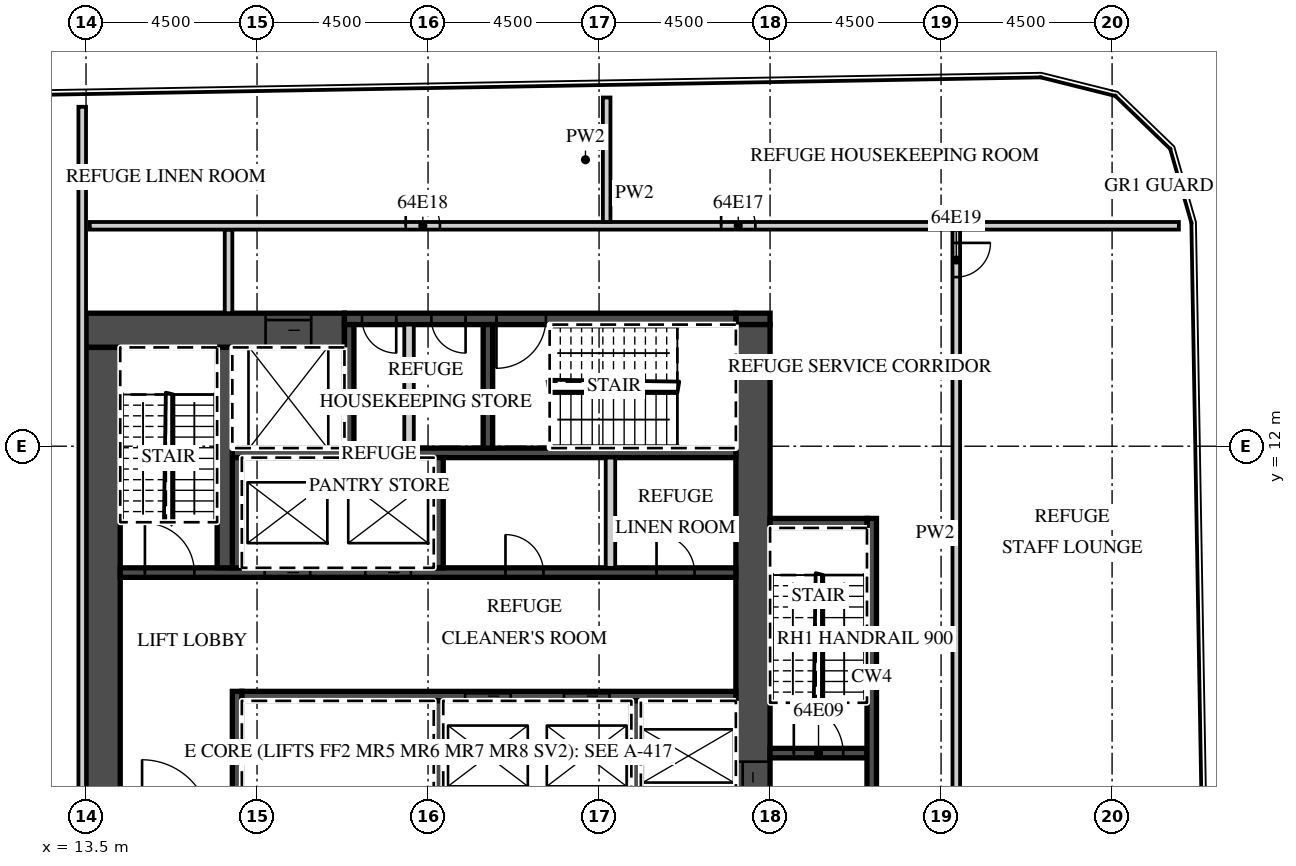
"""IFC4 building model, lengths in metres.
Left out: names, types, materials, properties, quantities, classifications, styles, units other than length and angle.
Written with IfcOpenShell. Run it as: python <this file> out.ifc"""

import sys

from ifc_helpers import new_model, si_unit, direction, frame, frame_2d, origin, place, context, subcontext, project, spatial, rectangle, extrude, element, fill, save


model = new_model("IFC4")
c1 = context("Model", 3, precision=1e-05, world=origin(), true_north=direction((0.0, 1.0)))
c2 = subcontext(c1, "Body", "Model", "MODEL_VIEW")
j1 = project(units=[si_unit("LENGTHUNIT", "METRE"), si_unit("PLANEANGLEUNIT", "RADIAN")], contexts=[c1])
p1 = place(None, origin())
s1 = spatial("IfcSite", under=j1, at=p1, CompositionType="ELEMENT")
p2 = place(p1, origin())
s2 = spatial("IfcBuilding", under=s1, at=p2, CompositionType="ELEMENT")
p3 = place(p2, frame((0.0, 0.0, 257.3)))
s3 = spatial("IfcBuildingStorey", under=s2, at=p3, CompositionType="ELEMENT", Elevation=257.3)
p4 = place(p3, frame((13.5, 15.05, 0.0), z_axis=(0.0, 0.0, 1.0), x_axis=(1.0, 0.0, 0.0)))
e1 = element("IfcWall", 1, at=p4, inside=s3, PredefinedType="SHEAR", context=c2, shape_type="SweptSolid", body=[
    extrude(rectangle(XDim=6.8, YDim=0.9, at=frame_2d((3.4, 0.0))), origin(), (0.0, 0.0, 1.0), 4.2),
])
p5 = place(p4, frame((4.725, 0.0, 0.0)))
e2 = element("IfcOpeningElement", 2, at=p5, cuts=e1, PredefinedType="OPENING", context=c2, shape_type="SweptSolid", body=[
    extrude(rectangle(XDim=1.2, YDim=2.1, at=frame_2d((0.6, 1.05))), frame((0.0, 0.46, 0.0), z_axis=(0.0, -1.0, 0.0), x_axis=(1.0, 0.0, 0.0)), (0.0, 0.0, 1.0), 0.92),
])
p6 = place(p3, frame((30.6, 15.35, 0.0), z_axis=(0.0, 0.0, 1.0), x_axis=(1.0, 0.0, 0.0)))
e3 = element("IfcWall", 3, at=p6, inside=s3, PredefinedType="SHEAR", context=c2, shape_type="SweptSolid", body=[
    extrude(rectangle(XDim=0.9, YDim=0.3, at=frame_2d((0.45, 0.0))), origin(), (0.0, 0.0, 1.0), 4.2),
])
p7 = place(p3, frame((20.3, 15.35, 0.0), z_axis=(0.0, 0.0, 1.0), x_axis=(1.0, 0.0, 0.0)))
e4 = element("IfcWall", 4, at=p7, inside=s3, PredefinedType="SHEAR", context=c2, shape_type="SweptSolid", body=[
    extrude(rectangle(XDim=10.3, YDim=0.3, at=frame_2d((5.15, 0.0))), origin(), (0.0, 0.0, 1.0), 4.2),
])
p8 = place(p7, frame((4.0, 0.0, 0.0)))
e5 = element("IfcOpeningElement", 5, at=p8, cuts=e4, PredefinedType="OPENING", context=c2, shape_type="SweptSolid", body=[
    extrude(rectangle(XDim=1.3, YDim=2.1, at=frame_2d((0.65, 1.05))), frame((0.0, 0.16, 0.0), z_axis=(0.0, -1.0, 0.0), x_axis=(1.0, 0.0, 0.0)), (0.0, 0.0, 1.0), 0.32),
])
p9 = place(p7, frame((2.288, 0.0, 0.0)))
e6 = element("IfcOpeningElement", 6, at=p9, cuts=e4, PredefinedType="OPENING", context=c2, shape_type="SweptSolid", body=[
    extrude(rectangle(XDim=0.9, YDim=2.1, at=frame_2d((0.45, 1.05))), frame((0.0, 0.16, 0.0), z_axis=(0.0, -1.0, 0.0), x_axis=(1.0, 0.0, 0.0)), (0.0, 0.0, 1.0), 0.32),
])
p10 = place(p7, frame((0.462, 0.0, 0.0)))
e7 = element("IfcOpeningElement", 7, at=p10, cuts=e4, PredefinedType="OPENING", context=c2, shape_type="SweptSolid", body=[
    extrude(rectangle(XDim=0.9, YDim=2.1, at=frame_2d((0.45, 1.05))), frame((0.0, 0.16, 0.0), z_axis=(0.0, -1.0, 0.0), x_axis=(1.0, 0.0, 0.0)), (0.0, 0.0, 1.0), 0.32),
])
p11 = place(p3, frame((31.05, 2.4, 0.0), z_axis=(0.0, 0.0, 1.0), x_axis=(0.0, 1.0, 0.0)))
e8 = element("IfcWall", 8, at=p11, inside=s3, PredefinedType="SHEAR", context=c2, shape_type="SweptSolid", body=[
    extrude(rectangle(XDim=12.8, YDim=0.9, at=frame_2d((6.4, 0.0))), origin(), (0.0, 0.0, 1.0), 4.2),
])
p12 = place(p11, frame((0.2, 0.0, 0.0)))
e9 = element("IfcOpeningElement", 9, at=p12, cuts=e8, PredefinedType="OPENING", context=c2, shape_type="SweptSolid", body=[
    extrude(rectangle(XDim=1.1, YDim=2.1, at=frame_2d((0.55, 1.05))), frame((0.0, 0.46, 0.0), z_axis=(0.0, -1.0, 0.0), x_axis=(1.0, 0.0, 0.0)), (0.0, 0.0, 1.0), 0.92),
])
p13 = place(p3, frame((13.95, 2.4, 0.0), z_axis=(0.0, 0.0, 1.0), x_axis=(0.0, 1.0, 0.0)))
e10 = element("IfcWall", 10, at=p13, inside=s3, PredefinedType="SHEAR", context=c2, shape_type="SweptSolid", body=[
    extrude(rectangle(XDim=12.2, YDim=0.9, at=frame_2d((6.1, 0.0))), origin(), (0.0, 0.0, 1.0), 4.2),
])
p14 = place(p3, frame((17.6, 5.425, 0.0), z_axis=(0.0, 0.0, 1.0), x_axis=(1.0, 0.0, 0.0)))
e11 = element("IfcWall", 11, at=p14, inside=s3, PredefinedType="SHEAR", context=c2, shape_type="SweptSolid", body=[
    extrude(rectangle(XDim=13.0, YDim=0.25, at=frame_2d((6.5, 0.0))), origin(), (0.0, 0.0, 1.0), 4.2),
])
p15 = place(p14, frame((8.475, 0.0, 0.0)))
e12 = element("IfcOpeningElement", 12, at=p15, cuts=e11, PredefinedType="OPENING", context=c2, shape_type="SweptSolid", body=[
    extrude(rectangle(XDim=1.2, YDim=2.1, at=frame_2d((0.6, 1.05))), frame((0.0, 0.135, 0.0), z_axis=(0.0, -1.0, 0.0), x_axis=(1.0, 0.0, 0.0)), (0.0, 0.0, 1.0), 0.27),
])
p16 = place(p14, frame((5.875, 0.0, 0.0)))
e13 = element("IfcOpeningElement", 13, at=p16, cuts=e11, PredefinedType="OPENING", context=c2, shape_type="SweptSolid", body=[
    extrude(rectangle(XDim=1.2, YDim=2.1, at=frame_2d((0.6, 1.05))), frame((0.0, 0.135, 0.0), z_axis=(0.0, -1.0, 0.0), x_axis=(1.0, 0.0, 0.0)), (0.0, 0.0, 1.0), 0.27),
])
p17 = place(p3, frame((17.475, 2.4, 0.0), z_axis=(0.0, 0.0, 1.0), x_axis=(0.0, 1.0, 0.0)))
e14 = element("IfcWall", 14, at=p17, inside=s3, PredefinedType="SHEAR", context=c2, shape_type="SweptSolid", body=[
    extrude(rectangle(XDim=3.15, YDim=0.25, at=frame_2d((1.575, 0.0))), origin(), (0.0, 0.0, 1.0), 4.2),
])
for number, where, z_axis, x_axis in (
    (15, (27.975, 2.4, 0.0), (0.0, 0.0, 1.0), (0.0, 1.0, 0.0)),
    (16, (22.775, 2.4, 0.0), (0.0, 0.0, 1.0), (0.0, 1.0, 0.0)),
):
    element("IfcWall", number, at=place(p3, frame(where, z_axis=z_axis, x_axis=x_axis)), inside=s3, PredefinedType="SHEAR", context=c2, shape_type="SweptSolid", body=[
        extrude(rectangle(XDim=2.9, YDim=0.25, at=frame_2d((1.45, 0.0))), origin(), (0.0, 0.0, 1.0), 4.2),
    ])
p18 = place(p3, frame((14.4, 8.675, 0.0), z_axis=(0.0, 0.0, 1.0), x_axis=(1.0, 0.0, 0.0)))
e17 = element("IfcWall", 17, at=p18, inside=s3, PredefinedType="SHEAR", context=c2, shape_type="SweptSolid", body=[
    extrude(rectangle(XDim=16.2, YDim=0.25, at=frame_2d((8.1, 0.0))), origin(), (0.0, 0.0, 1.0), 4.2),
])
p19 = place(p18, frame((6.45, 0.0, 0.0)))
e18 = element("IfcOpeningElement", 18, at=p19, cuts=e17, PredefinedType="OPENING", context=c2, shape_type="SweptSolid", body=[
    extrude(rectangle(XDim=1.2, YDim=2.1, at=frame_2d((0.6, 1.05))), frame((0.0, 0.135, 0.0), z_axis=(0.0, -1.0, 0.0), x_axis=(1.0, 0.0, 0.0)), (0.0, 0.0, 1.0), 0.27),
])
p20 = place(p18, frame((3.8, 0.0, 0.0)))
e19 = element("IfcOpeningElement", 19, at=p20, cuts=e17, PredefinedType="OPENING", context=c2, shape_type="SweptSolid", body=[
    extrude(rectangle(XDim=1.2, YDim=2.1, at=frame_2d((0.6, 1.05))), frame((0.0, 0.135, 0.0), z_axis=(0.0, -1.0, 0.0), x_axis=(1.0, 0.0, 0.0)), (0.0, 0.0, 1.0), 0.27),
])
p21 = place(p18, frame((0.65, 0.0, 0.0)))
e20 = element("IfcOpeningElement", 20, at=p21, cuts=e17, PredefinedType="OPENING", context=c2, shape_type="SweptSolid", body=[
    extrude(rectangle(XDim=1.3, YDim=2.1, at=frame_2d((0.65, 1.05))), frame((0.0, 0.135, 0.0), z_axis=(0.0, -1.0, 0.0), x_axis=(1.0, 0.0, 0.0)), (0.0, 0.0, 1.0), 0.27),
])
p22 = place(p18, frame((14.113, 0.0, 0.0)))
e21 = element("IfcOpeningElement", 21, at=p22, cuts=e17, PredefinedType="OPENING", context=c2, shape_type="SweptSolid", body=[
    extrude(rectangle(XDim=1.0, YDim=2.1, at=frame_2d((0.5, 1.05))), frame((0.0, 0.135, 0.0), z_axis=(0.0, -1.0, 0.0), x_axis=(1.0, 0.0, 0.0)), (0.0, 0.0, 1.0), 0.27),
])
p23 = place(p18, frame((10.137, 0.0, 0.0)))
e22 = element("IfcOpeningElement", 22, at=p23, cuts=e17, PredefinedType="OPENING", context=c2, shape_type="SweptSolid", body=[
    extrude(rectangle(XDim=1.0, YDim=2.1, at=frame_2d((0.5, 1.05))), frame((0.0, 0.135, 0.0), z_axis=(0.0, -1.0, 0.0), x_axis=(1.0, 0.0, 0.0)), (0.0, 0.0, 1.0), 0.27),
])
p24 = place(p3, frame((17.35, 11.825, 0.0), z_axis=(0.0, 0.0, 1.0), x_axis=(1.0, 0.0, 0.0)))
e23 = element("IfcWall", 23, at=p24, inside=s3, PredefinedType="SHEAR", context=c2, shape_type="SweptSolid", body=[
    extrude(rectangle(XDim=13.25, YDim=0.25, at=frame_2d((6.625, 0.0))), origin(), (0.0, 0.0, 1.0), 4.2),
])
for number, where, z_axis, x_axis in (
    (24, (17.475, 8.8, 0.0), (0.0, 0.0, 1.0), (0.0, 1.0, 0.0)),
    (25, (22.775, 8.8, 0.0), (0.0, 0.0, 1.0), (0.0, 1.0, 0.0)),
):
    element("IfcWall", number, at=place(p3, frame(where, z_axis=z_axis, x_axis=x_axis)), inside=s3, PredefinedType="SHEAR", context=c2, shape_type="SweptSolid", body=[
        extrude(rectangle(XDim=2.9, YDim=0.25, at=frame_2d((1.45, 0.0))), origin(), (0.0, 0.0, 1.0), 4.2),
    ])
p25 = place(p3, frame((27.3, 8.8, 0.0), z_axis=(0.0, 0.0, 1.0), x_axis=(0.0, 1.0, 0.0)))
e26 = element("IfcWall", 26, at=p25, inside=s3, PredefinedType="PARTITIONING", context=c2, shape_type="SweptSolid", body=[
    extrude(rectangle(XDim=2.9, YDim=0.25, at=frame_2d((1.45, 0.0))), origin(), (0.0, 0.0, 1.0), 4.2),
])
p26 = place(p3, frame((17.15, 8.8, 0.0), z_axis=(0.0, 0.0, 1.0), x_axis=(0.0, 1.0, 0.0)))
e27 = element("IfcWall", 27, at=p26, inside=s3, PredefinedType="SHEAR", context=c2, shape_type="SweptSolid", body=[
    extrude(rectangle(XDim=5.8, YDim=0.4, at=frame_2d((2.9, 0.0))), origin(), (0.0, 0.0, 1.0), 4.2),
])
for number, where, z_axis, x_axis in (
    (28, (20.425, 11.95, 0.0), (0.0, 0.0, 1.0), (0.0, 1.0, 0.0)),
    (29, (24.075, 11.95, 0.0), (0.0, 0.0, 1.0), (0.0, 1.0, 0.0)),
):
    element("IfcWall", number, at=place(p3, frame(where, z_axis=z_axis, x_axis=x_axis)), inside=s3, PredefinedType="SHEAR", context=c2, shape_type="SweptSolid", body=[
        extrude(rectangle(XDim=3.25, YDim=0.25, at=frame_2d((1.625, 0.0))), origin(), (0.0, 0.0, 1.0), 4.2),
    ])
p27 = place(p3, frame((22.0, 11.95, 0.0), z_axis=(0.0, 0.0, 1.0), x_axis=(0.0, 1.0, 0.0)))
e30 = element("IfcWall", 30, at=p27, inside=s3, PredefinedType="PARTITIONING", context=c2, shape_type="SweptSolid", body=[
    extrude(rectangle(XDim=3.25, YDim=0.25, at=frame_2d((1.625, 0.0))), origin(), (0.0, 0.0, 1.0), 4.2),
])
p28 = place(p3, frame((31.5, 3.925, 0.0), z_axis=(0.0, 0.0, 1.0), x_axis=(1.0, 0.0, 0.0)))
e31 = element("IfcWall", 31, at=p28, inside=s3, PredefinedType="SHEAR", context=c2, shape_type="SweptSolid", body=[
    extrude(rectangle(XDim=2.55, YDim=0.25, at=frame_2d((1.275, 0.0))), origin(), (0.0, 0.0, 1.0), 4.2),
])
p29 = place(p28, frame((0.625, 0.0, 0.0)))
e32 = element("IfcOpeningElement", 32, at=p29, cuts=e31, PredefinedType="OPENING", context=c2, shape_type="SweptSolid", body=[
    extrude(rectangle(XDim=1.3, YDim=2.1, at=frame_2d((0.65, 1.05))), frame((0.0, 0.135, 0.0), z_axis=(0.0, -1.0, 0.0), x_axis=(1.0, 0.0, 0.0)), (0.0, 0.0, 1.0), 0.27),
])
p30 = place(p3, frame((34.175, 1.75, 0.0), z_axis=(0.0, 0.0, 1.0), x_axis=(0.0, 1.0, 0.0)))
e33 = element("IfcWall", 33, at=p30, inside=s3, PredefinedType="SHEAR", context=c2, shape_type="SweptSolid", body=[
    extrude(rectangle(XDim=8.35, YDim=0.25, at=frame_2d((4.175, 0.0))), origin(), (0.0, 0.0, 1.0), 4.2),
])
p31 = place(p3, frame((31.5, 9.975, 0.0), z_axis=(0.0, 0.0, 1.0), x_axis=(1.0, 0.0, 0.0)))
e34 = element("IfcWall", 34, at=p31, inside=s3, PredefinedType="SHEAR", context=c2, shape_type="SweptSolid", body=[
    extrude(rectangle(XDim=2.55, YDim=0.25, at=frame_2d((1.275, 0.0))), origin(), (0.0, 0.0, 1.0), 4.2),
])
p32 = place(p3, frame((17.25, 15.5, 0.0), z_axis=(0.0, 0.0, 1.0), x_axis=(0.0, 1.0, 0.0)))
e35 = element("IfcWall", 35, at=p32, inside=s3, PredefinedType="PARTITIONING", context=c2, shape_type="SweptSolid", body=[
    extrude(rectangle(XDim=2.2, YDim=0.2, at=frame_2d((1.1, 0.0))), origin(), (0.0, 0.0, 1.0), 4.2),
])
p33 = place(p3, frame((36.4, 1.75, 0.0), z_axis=(0.0, 0.0, 1.0), x_axis=(0.0, 1.0, 0.0)))
e36 = element("IfcWall", 36, at=p33, inside=s3, PredefinedType="PARTITIONING", context=c2, shape_type="SweptSolid", body=[
    extrude(rectangle(XDim=15.95, YDim=0.2, at=frame_2d((7.975, 0.0))), origin(), (0.0, 0.0, 1.0), 4.2),
])
p34 = place(p33, frame((14.7, 0.0, 0.0)))
e37 = element("IfcOpeningElement", 37, at=p34, cuts=e36, PredefinedType="OPENING", context=c2, shape_type="SweptSolid", body=[
    extrude(rectangle(XDim=0.9, YDim=2.1, at=frame_2d((0.45, 1.05))), frame((0.0, 0.11, 0.0), z_axis=(0.0, -1.0, 0.0), x_axis=(1.0, 0.0, 0.0)), (0.0, 0.0, 1.0), 0.22),
])
p35 = place(p3, frame((13.6, 17.8, 0.0), z_axis=(0.0, 0.0, 1.0), x_axis=(1.0, 0.0, 0.0)))
e38 = element("IfcWall", 38, at=p35, inside=s3, PredefinedType="PARTITIONING", context=c2, shape_type="SweptSolid", body=[
    extrude(rectangle(XDim=28.657, YDim=0.2, at=frame_2d((14.329, 0.0))), origin(), (0.0, 0.0, 1.0), 4.2),
])
p36 = place(p35, frame((16.613, 0.0, 0.0)))
e39 = element("IfcOpeningElement", 39, at=p36, cuts=e38, PredefinedType="OPENING", context=c2, shape_type="SweptSolid", body=[
    extrude(rectangle(XDim=0.9, YDim=2.1, at=frame_2d((0.45, 1.05))), frame((0.0, 0.11, 0.0), z_axis=(0.0, -1.0, 0.0), x_axis=(1.0, 0.0, 0.0)), (0.0, 0.0, 1.0), 0.22),
])
p37 = place(p35, frame((8.312, 0.0, 0.0)))
e40 = element("IfcOpeningElement", 40, at=p37, cuts=e38, PredefinedType="OPENING", context=c2, shape_type="SweptSolid", body=[
    extrude(rectangle(XDim=0.9, YDim=2.1, at=frame_2d((0.45, 1.05))), frame((0.0, 0.11, 0.0), z_axis=(0.0, -1.0, 0.0), x_axis=(1.0, 0.0, 0.0)), (0.0, 0.0, 1.0), 0.22),
])
p38 = place(p3, frame((27.2, 17.9, 0.0), z_axis=(0.0, 0.0, 1.0), x_axis=(0.0, 1.0, 0.0)))
e41 = element("IfcWall", 41, at=p38, inside=s3, PredefinedType="PARTITIONING", context=c2, shape_type="SweptSolid", body=[
    extrude(rectangle(XDim=3.276, YDim=0.2, at=frame_2d((1.638, 0.0))), origin(), (0.0, 0.0, 1.0), 4.2),
])
p39 = place(p3, frame((13.4, 1.8, 0.0), z_axis=(0.0, 0.0, 1.0), x_axis=(0.0, 1.0, 0.0)))
e42 = element("IfcWall", 42, at=p39, inside=s3, PredefinedType="PARTITIONING", context=c2, shape_type="SweptSolid", body=[
    extrude(rectangle(XDim=19.131, YDim=0.2, at=frame_2d((9.565, 0.0))), origin(), (0.0, 0.0, 1.0), 4.2),
])
p40 = place(p19, origin())
e43 = element("IfcDoor", 43, at=p40, inside=s3, OperationType="SLIDING_TO_LEFT", PredefinedType="DOOR", context=c2, shape_type="SweptSolid", body=[
    extrude(rectangle(XDim=1.2, YDim=2.1, at=frame_2d((0.6, 1.05))), frame((0.0, 0.025, 0.0), z_axis=(0.0, -1.0, 0.0), x_axis=(1.0, 0.0, 0.0)), (0.0, 0.0, 1.0), 0.05),
])
fill(e18, e43)
p41 = place(p20, origin())
e44 = element("IfcDoor", 44, at=p41, inside=s3, OperationType="SLIDING_TO_RIGHT", PredefinedType="DOOR", context=c2, shape_type="SweptSolid", body=[
    extrude(rectangle(XDim=1.2, YDim=2.1, at=frame_2d((0.6, 1.05))), frame((0.0, 0.025, 0.0), z_axis=(0.0, -1.0, 0.0), x_axis=(1.0, 0.0, 0.0)), (0.0, 0.0, 1.0), 0.05),
])
fill(e19, e44)
p42 = place(p15, origin())
e45 = element("IfcDoor", 45, at=p42, inside=s3, OperationType="SLIDING_TO_LEFT", PredefinedType="DOOR", context=c2, shape_type="SweptSolid", body=[
    extrude(rectangle(XDim=1.2, YDim=2.1, at=frame_2d((0.6, 1.05))), frame((0.0, 0.025, 0.0), z_axis=(0.0, -1.0, 0.0), x_axis=(1.0, 0.0, 0.0)), (0.0, 0.0, 1.0), 0.05),
])
fill(e12, e45)
p43 = place(p16, origin())
e46 = element("IfcDoor", 46, at=p43, inside=s3, OperationType="SLIDING_TO_RIGHT", PredefinedType="DOOR", context=c2, shape_type="SweptSolid", body=[
    extrude(rectangle(XDim=1.2, YDim=2.1, at=frame_2d((0.6, 1.05))), frame((0.0, 0.025, 0.0), z_axis=(0.0, -1.0, 0.0), x_axis=(1.0, 0.0, 0.0)), (0.0, 0.0, 1.0), 0.05),
])
fill(e13, e46)
p44 = place(p5, origin())
e47 = element("IfcDoor", 47, at=p44, inside=s3, OperationType="SLIDING_TO_LEFT", PredefinedType="DOOR", context=c2, shape_type="SweptSolid", body=[
    extrude(rectangle(XDim=1.2, YDim=2.1, at=frame_2d((0.6, 1.05))), frame((0.0, 0.025, 0.0), z_axis=(0.0, -1.0, 0.0), x_axis=(1.0, 0.0, 0.0)), (0.0, 0.0, 1.0), 0.05),
])
fill(e2, e47)
p45 = place(p12, origin())
e48 = element("IfcDoor", 48, at=p45, inside=s3, OperationType="SLIDING_TO_LEFT", PredefinedType="DOOR", context=c2, shape_type="SweptSolid", body=[
    extrude(rectangle(XDim=1.1, YDim=2.1, at=frame_2d((0.55, 1.05))), frame((0.0, 0.025, 0.0), z_axis=(0.0, -1.0, 0.0), x_axis=(1.0, 0.0, 0.0)), (0.0, 0.0, 1.0), 0.05),
])
fill(e9, e48)
p46 = place(p29, origin())
e49 = element("IfcDoor", 49, at=p46, inside=s3, OperationType="SINGLE_SWING_LEFT", PredefinedType="DOOR", context=c2, shape_type="SweptSolid", body=[
    extrude(rectangle(XDim=1.3, YDim=2.1, at=frame_2d((0.65, 1.05))), frame((0.0, 0.025, 0.0), z_axis=(0.0, -1.0, 0.0), x_axis=(1.0, 0.0, 0.0)), (0.0, 0.0, 1.0), 0.05),
])
fill(e32, e49)
p47 = place(p21, origin())
e50 = element("IfcDoor", 50, at=p47, inside=s3, OperationType="SINGLE_SWING_LEFT", PredefinedType="DOOR", context=c2, shape_type="SweptSolid", body=[
    extrude(rectangle(XDim=1.3, YDim=2.1, at=frame_2d((0.65, 1.05))), frame((0.0, 0.025, 0.0), z_axis=(0.0, -1.0, 0.0), x_axis=(1.0, 0.0, 0.0)), (0.0, 0.0, 1.0), 0.05),
])
fill(e20, e50)
p48 = place(p8, origin())
e51 = element("IfcDoor", 51, at=p48, inside=s3, OperationType="SINGLE_SWING_LEFT", PredefinedType="DOOR", context=c2, shape_type="SweptSolid", body=[
    extrude(rectangle(XDim=1.3, YDim=2.1, at=frame_2d((0.65, 1.05))), frame((0.0, 0.025, 0.0), z_axis=(0.0, -1.0, 0.0), x_axis=(1.0, 0.0, 0.0)), (0.0, 0.0, 1.0), 0.05),
])
fill(e5, e51)
p49 = place(p9, origin())
e52 = element("IfcDoor", 52, at=p49, inside=s3, OperationType="SINGLE_SWING_RIGHT", PredefinedType="DOOR", context=c2, shape_type="SweptSolid", body=[
    extrude(rectangle(XDim=0.9, YDim=2.1, at=frame_2d((0.45, 1.05))), frame((0.0, 0.025, 0.0), z_axis=(0.0, -1.0, 0.0), x_axis=(1.0, 0.0, 0.0)), (0.0, 0.0, 1.0), 0.05),
])
fill(e6, e52)
p50 = place(p10, origin())
e53 = element("IfcDoor", 53, at=p50, inside=s3, OperationType="SINGLE_SWING_RIGHT", PredefinedType="DOOR", context=c2, shape_type="SweptSolid", body=[
    extrude(rectangle(XDim=0.9, YDim=2.1, at=frame_2d((0.45, 1.05))), frame((0.0, 0.025, 0.0), z_axis=(0.0, -1.0, 0.0), x_axis=(1.0, 0.0, 0.0)), (0.0, 0.0, 1.0), 0.05),
])
fill(e7, e53)
p51 = place(p22, origin())
e54 = element("IfcDoor", 54, at=p51, inside=s3, OperationType="SINGLE_SWING_LEFT", PredefinedType="DOOR", context=c2, shape_type="SweptSolid", body=[
    extrude(rectangle(XDim=1.0, YDim=2.1, at=frame_2d((0.5, 1.05))), frame((0.0, 0.025, 0.0), z_axis=(0.0, -1.0, 0.0), x_axis=(1.0, 0.0, 0.0)), (0.0, 0.0, 1.0), 0.05),
])
fill(e21, e54)
p52 = place(p23, origin())
e55 = element("IfcDoor", 55, at=p52, inside=s3, OperationType="SINGLE_SWING_LEFT", PredefinedType="DOOR", context=c2, shape_type="SweptSolid", body=[
    extrude(rectangle(XDim=1.0, YDim=2.1, at=frame_2d((0.5, 1.05))), frame((0.0, 0.025, 0.0), z_axis=(0.0, -1.0, 0.0), x_axis=(1.0, 0.0, 0.0)), (0.0, 0.0, 1.0), 0.05),
])
fill(e22, e55)
p53 = place(p36, origin())
e56 = element("IfcDoor", 56, at=p53, inside=s3, OperationType="SINGLE_SWING_LEFT", PredefinedType="DOOR", context=c2, shape_type="SweptSolid", body=[
    extrude(rectangle(XDim=0.9, YDim=2.1, at=frame_2d((0.45, 1.05))), frame((0.0, 0.025, 0.0), z_axis=(0.0, -1.0, 0.0), x_axis=(1.0, 0.0, 0.0)), (0.0, 0.0, 1.0), 0.05),
])
fill(e39, e56)
p54 = place(p37, origin())
e57 = element("IfcDoor", 57, at=p54, inside=s3, OperationType="SINGLE_SWING_LEFT", PredefinedType="DOOR", context=c2, shape_type="SweptSolid", body=[
    extrude(rectangle(XDim=0.9, YDim=2.1, at=frame_2d((0.45, 1.05))), frame((0.0, 0.025, 0.0), z_axis=(0.0, -1.0, 0.0), x_axis=(1.0, 0.0, 0.0)), (0.0, 0.0, 1.0), 0.05),
])
fill(e40, e57)
p55 = place(p34, origin())
e58 = element("IfcDoor", 58, at=p55, inside=s3, OperationType="SINGLE_SWING_RIGHT", PredefinedType="DOOR", context=c2, shape_type="SweptSolid", body=[
    extrude(rectangle(XDim=0.9, YDim=2.1, at=frame_2d((0.45, 1.05))), frame((0.0, 0.025, 0.0), z_axis=(0.0, -1.0, 0.0), x_axis=(1.0, 0.0, 0.0)), (0.0, 0.0, 1.0), 0.05),
])
fill(e37, e58)
save(model, sys.argv[1])
